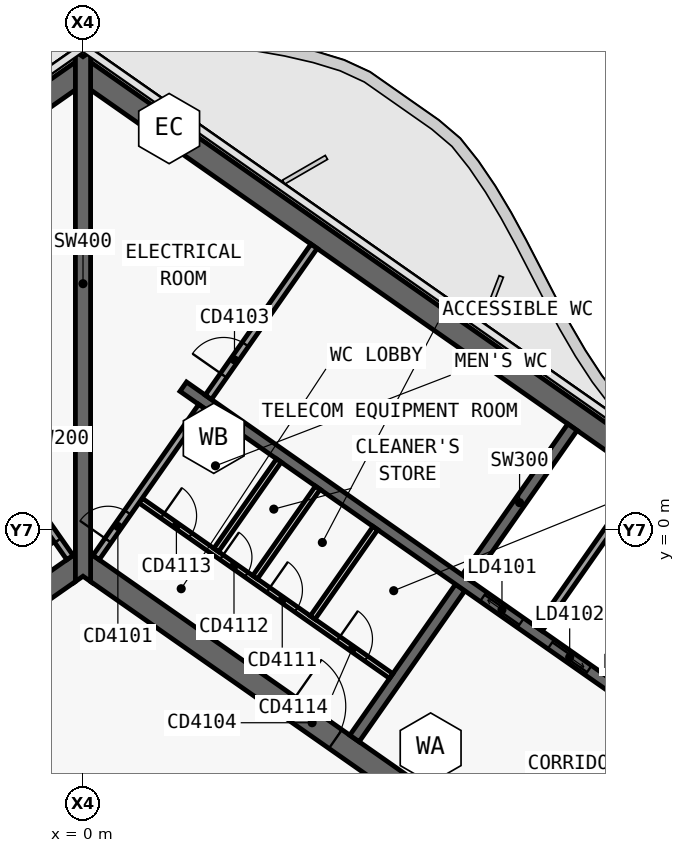
"""IFC4 building model, lengths in metres.
Left out: names, types, materials, properties, quantities, classifications, styles, units other than length and angle.
Written with IfcOpenShell. Run it as: python <this file> out.ifc"""

import sys

from ifc_helpers import new_model, si_unit, direction, frame, frame_2d, origin, place, context, subcontext, project, spatial, polyline, rectangle, outline, extrude, element, fill, save


model = new_model("IFC4")
c1 = context("Model", 3, precision=1e-05, world=origin(), true_north=direction((0.0, 1.0)))
c2 = subcontext(c1, "Body", "Model", "MODEL_VIEW")
j1 = project(units=[si_unit("LENGTHUNIT", "METRE"), si_unit("PLANEANGLEUNIT", "RADIAN")], contexts=[c1])
p1 = place(None, origin())
s1 = spatial("IfcSite", under=j1, at=p1, CompositionType="ELEMENT")
p2 = place(p1, origin())
s2 = spatial("IfcBuilding", under=s1, at=p2, CompositionType="ELEMENT")
p3 = place(p2, frame((0.0, 0.0, 225.4)))
s3 = spatial("IfcBuildingStorey", under=s2, at=p3, CompositionType="ELEMENT", Elevation=225.4)
p4 = place(p3, frame((-0.028, 12.066, 0.0), z_axis=(0.0, 0.0, 1.0), x_axis=(-0.819151382952, -0.573577380837, 0.0)))
e1 = element("IfcWall", 1, at=p4, inside=s3, PredefinedType="SHEAR", context=c2, shape_type="SweptSolid", body=[
    extrude(outline(polyline([(33.898, 0.3), (0.42, 0.3), (0.0, -0.3), (33.898, -0.3), (33.898, 0.3)])), origin(), (0.0, 0.0, 1.0), 3.9),
])
p5 = place(p3, frame((-0.028, -0.874, 0.0), z_axis=(0.0, 0.0, 1.0), x_axis=(-0.819150035022, -0.573579305871, 0.0)))
e2 = element("IfcWall", 2, at=p5, inside=s3, PredefinedType="SHEAR", context=c2, shape_type="SweptSolid", body=[
    extrude(outline(polyline([(26.476, 0.3), (0.42, 0.3), (0.0, -0.3), (26.476, -0.3), (26.476, 0.3)])), origin(), (0.0, 0.0, 1.0), 3.9),
])
p6 = place(p5, frame((2.976, 0.0, 0.0)))
e3 = element("IfcOpeningElement", 3, at=p6, cuts=e2, PredefinedType="OPENING", context=c2, shape_type="SweptSolid", body=[
    extrude(rectangle(XDim=2.4, YDim=2.1, at=frame_2d((1.2, 1.05))), frame((0.0, 0.31, 0.0), z_axis=(0.0, -1.0, 0.0), x_axis=(1.0, 0.0, 0.0)), (0.0, 0.0, 1.0), 0.62),
])
p7 = place(p5, frame((11.776, 0.0, 0.0)))
e4 = element("IfcOpeningElement", 4, at=p7, cuts=e2, PredefinedType="OPENING", context=c2, shape_type="SweptSolid", body=[
    extrude(rectangle(XDim=2.4, YDim=2.1, at=frame_2d((1.2, 1.05))), frame((0.0, 0.31, 0.0), z_axis=(0.0, -1.0, 0.0), x_axis=(1.0, 0.0, 0.0)), (0.0, 0.0, 1.0), 0.62),
])
p8 = place(p3, frame((0.028, 12.066, 0.0), z_axis=(0.0, 0.0, 1.0), x_axis=(0.819151382952, -0.573577380837, 0.0)))
e5 = element("IfcWall", 5, at=p8, inside=s3, PredefinedType="SHEAR", context=c2, shape_type="SweptSolid", body=[
    extrude(outline(polyline([(33.898, 0.3), (0.0, 0.3), (0.42, -0.3), (33.898, -0.3), (33.898, 0.3)])), origin(), (0.0, 0.0, 1.0), 3.9),
])
p9 = place(p3, frame((0.028, -0.874, 0.0), z_axis=(0.0, 0.0, 1.0), x_axis=(0.819150035022, -0.573579305871, 0.0)))
e6 = element("IfcWall", 6, at=p9, inside=s3, PredefinedType="SHEAR", context=c2, shape_type="SweptSolid", body=[
    extrude(outline(polyline([(26.476, 0.3), (0.0, 0.3), (0.42, -0.3), (26.476, -0.3), (26.476, 0.3)])), origin(), (0.0, 0.0, 1.0), 3.9),
])
p10 = place(p9, frame((6.576, 0.0, 0.0)))
e7 = element("IfcOpeningElement", 7, at=p10, cuts=e6, PredefinedType="OPENING", context=c2, shape_type="SweptSolid", body=[
    extrude(rectangle(XDim=1.5, YDim=2.1, at=frame_2d((0.75, 1.05))), frame((0.0, 0.31, 0.0), z_axis=(0.0, -1.0, 0.0), x_axis=(1.0, 0.0, 0.0)), (0.0, 0.0, 1.0), 0.62),
])
p11 = place(p9, frame((12.226, 0.0, 0.0)))
e8 = element("IfcOpeningElement", 8, at=p11, cuts=e6, PredefinedType="OPENING", context=c2, shape_type="SweptSolid", body=[
    extrude(rectangle(XDim=1.5, YDim=2.1, at=frame_2d((0.75, 1.05))), frame((0.0, 0.31, 0.0), z_axis=(0.0, -1.0, 0.0), x_axis=(1.0, 0.0, 0.0)), (0.0, 0.0, 1.0), 0.62),
])
p12 = place(p3, frame((7.143, -5.49, 0.0), z_axis=(0.0, 0.0, 1.0), x_axis=(0.573617744349, 0.819123118565, 0.0)))
e9 = element("IfcWall", 9, at=p12, inside=s3, PredefinedType="SHEAR", context=c2, shape_type="SweptSolid", body=[
    extrude(outline(polyline([(0.0, 0.15), (0.0, -0.15), (4.85, -0.15), (4.85, 0.15), (0.0, 0.15)])), origin(), (0.0, 0.0, 1.0), 3.9),
])
p13 = place(p3, frame((10.097, -1.271, 0.0), z_axis=(0.0, 0.0, 1.0), x_axis=(0.573560315113, 0.819163332265, 0.0)))
e10 = element("IfcWall", 10, at=p13, inside=s3, PredefinedType="SHEAR", context=c2, shape_type="SweptSolid", body=[
    extrude(outline(polyline([(4.85, -0.15), (4.85, 0.15), (0.0, 0.15), (0.0, -0.15), (4.85, -0.15)])), origin(), (0.0, 0.0, 1.0), 3.9),
])
p14 = place(p3, frame((2.638, 3.768, 0.0), z_axis=(0.0, 0.0, 1.0), x_axis=(0.819155014212, -0.573572194837, 0.0)))
e11 = element("IfcWall", 11, at=p14, inside=s3, PredefinedType="SHEAR", context=c2, shape_type="SweptSolid", body=[
    extrude(outline(polyline([(0.0, 0.15), (0.0, -0.15), (26.4, -0.15), (26.4, 0.15), (0.0, 0.15)])), origin(), (0.0, 0.0, 1.0), 3.9),
])
p15 = place(p14, frame((9.637, 0.0, 0.0)))
e12 = element("IfcOpeningElement", 12, at=p15, cuts=e11, PredefinedType="OPENING", context=c2, shape_type="SweptSolid", body=[
    extrude(rectangle(XDim=1.2, YDim=2.1, at=frame_2d((0.6, 1.05))), frame((0.0, 0.16, 0.0), z_axis=(0.0, -1.0, 0.0), x_axis=(1.0, 0.0, 0.0)), (0.0, 0.0, 1.0), 0.32),
])
p16 = place(p14, frame((11.812, 0.0, 0.0)))
e13 = element("IfcOpeningElement", 13, at=p16, cuts=e11, PredefinedType="OPENING", context=c2, shape_type="SweptSolid", body=[
    extrude(rectangle(XDim=1.2, YDim=2.1, at=frame_2d((0.6, 1.05))), frame((0.0, 0.16, 0.0), z_axis=(0.0, -1.0, 0.0), x_axis=(1.0, 0.0, 0.0)), (0.0, 0.0, 1.0), 0.32),
])
p17 = place(p14, frame((13.988, 0.0, 0.0)))
e14 = element("IfcOpeningElement", 14, at=p17, cuts=e11, PredefinedType="OPENING", context=c2, shape_type="SweptSolid", body=[
    extrude(rectangle(XDim=1.2, YDim=2.1, at=frame_2d((0.6, 1.05))), frame((0.0, 0.16, 0.0), z_axis=(0.0, -1.0, 0.0), x_axis=(1.0, 0.0, 0.0)), (0.0, 0.0, 1.0), 0.32),
])
p18 = place(p14, frame((16.262, 0.0, 0.0)))
e15 = element("IfcOpeningElement", 15, at=p18, cuts=e11, PredefinedType="OPENING", context=c2, shape_type="SweptSolid", body=[
    extrude(rectangle(XDim=1.0, YDim=2.1, at=frame_2d((0.5, 1.05))), frame((0.0, 0.16, 0.0), z_axis=(0.0, -1.0, 0.0), x_axis=(1.0, 0.0, 0.0)), (0.0, 0.0, 1.0), 0.32),
])
p19 = place(p3, frame((0.0, -1.361, 0.0), z_axis=(0.0, 0.0, 1.0), x_axis=(0.0, 1.0, 0.0)))
e16 = element("IfcWall", 16, at=p19, inside=s3, PredefinedType="SHEAR", context=c2, shape_type="SweptSolid", body=[
    extrude(outline(polyline([(0.14, 0.2), (0.0, 0.2), (0.14, 0.0), (0.0, -0.2), (0.14, -0.2), (1.012, -0.2), (12.94, -0.2), (13.813, -0.2), (13.893, -0.2), (13.933, -0.172), (13.813, 0.0), (13.933, 0.172), (13.893, 0.2), (13.813, 0.2), (12.94, 0.2), (1.012, 0.2), (0.14, 0.2)])), origin(), (0.0, 0.0, 1.0), 3.9),
])
p20 = place(p3, frame((12.001, -2.605, 0.0), z_axis=(0.0, 0.0, 1.0), x_axis=(0.573560315113, 0.819163332265, 0.0)))
e17 = element("IfcWall", 17, at=p20, inside=s3, PredefinedType="SOLIDWALL", context=c2, shape_type="SweptSolid", body=[
    extrude(rectangle(XDim=4.85, YDim=0.2, at=frame_2d((2.425, 0.0))), origin(), (0.0, 0.0, 1.0), 3.9),
])
p21 = place(p3, frame((13.783, -3.852, 0.0), z_axis=(0.0, 0.0, 1.0), x_axis=(0.573594092424, 0.81913968109, 0.0)))
e18 = element("IfcWall", 18, at=p21, inside=s3, PredefinedType="SOLIDWALL", context=c2, shape_type="SweptSolid", body=[
    extrude(rectangle(XDim=4.85, YDim=0.2, at=frame_2d((2.425, 0.0))), origin(), (0.0, 0.0, 1.0), 3.9),
])
p22 = place(p3, frame((1.516, 0.77, 0.0), z_axis=(0.0, 0.0, 1.0), x_axis=(0.819146424436, -0.573584462249, 0.0)))
e19 = element("IfcWall", 19, at=p22, inside=s3, PredefinedType="PARTITIONING", context=c2, shape_type="SweptSolid", body=[
    extrude(rectangle(XDim=8.05, YDim=0.15, at=frame_2d((4.025, 0.0))), origin(), (0.0, 0.0, 1.0), 3.62),
])
p23 = place(p22, frame((0.7, 0.0, 0.0)))
e20 = element("IfcOpeningElement", 20, at=p23, cuts=e19, PredefinedType="OPENING", context=c2, shape_type="SweptSolid", body=[
    extrude(rectangle(XDim=0.9, YDim=2.1, at=frame_2d((0.45, 1.05))), frame((0.0, 0.085, 0.0), z_axis=(0.0, -1.0, 0.0), x_axis=(1.0, 0.0, 0.0)), (0.0, 0.0, 1.0), 0.17),
])
p24 = place(p22, frame((2.6, 0.0, 0.0)))
e21 = element("IfcOpeningElement", 21, at=p24, cuts=e19, PredefinedType="OPENING", context=c2, shape_type="SweptSolid", body=[
    extrude(rectangle(XDim=0.8, YDim=2.1, at=frame_2d((0.4, 1.05))), frame((0.0, 0.085, 0.0), z_axis=(0.0, -1.0, 0.0), x_axis=(1.0, 0.0, 0.0)), (0.0, 0.0, 1.0), 0.17),
])
p25 = place(p22, frame((4.1, 0.0, 0.0)))
e22 = element("IfcOpeningElement", 22, at=p25, cuts=e19, PredefinedType="OPENING", context=c2, shape_type="SweptSolid", body=[
    extrude(rectangle(XDim=0.9, YDim=2.1, at=frame_2d((0.45, 1.05))), frame((0.0, 0.085, 0.0), z_axis=(0.0, -1.0, 0.0), x_axis=(1.0, 0.0, 0.0)), (0.0, 0.0, 1.0), 0.17),
])
p26 = place(p22, frame((6.35, 0.0, 0.0)))
e23 = element("IfcOpeningElement", 23, at=p26, cuts=e19, PredefinedType="OPENING", context=c2, shape_type="SweptSolid", body=[
    extrude(rectangle(XDim=0.9, YDim=2.1, at=frame_2d((0.45, 1.05))), frame((0.0, 0.085, 0.0), z_axis=(0.0, -1.0, 0.0), x_axis=(1.0, 0.0, 0.0)), (0.0, 0.0, 1.0), 0.17),
])
p27 = place(p3, frame((3.504, -0.531, 0.0), z_axis=(0.0, 0.0, 1.0), x_axis=(0.573582013179, 0.819148139324, 0.0)))
e24 = element("IfcWall", 24, at=p27, inside=s3, PredefinedType="PARTITIONING", context=c2, shape_type="SweptSolid", body=[
    extrude(rectangle(XDim=2.875, YDim=0.15, at=frame_2d((1.438, 0.0))), origin(), (0.0, 0.0, 1.0), 3.62),
])
p28 = place(p3, frame((4.528, -1.248, 0.0), z_axis=(0.0, 0.0, 1.0), x_axis=(0.573621911162, 0.819120200602, 0.0)))
e25 = element("IfcWall", 25, at=p28, inside=s3, PredefinedType="PARTITIONING", context=c2, shape_type="SweptSolid", body=[
    extrude(rectangle(XDim=2.875, YDim=0.15, at=frame_2d((1.438, 0.0))), origin(), (0.0, 0.0, 1.0), 3.62),
])
p29 = place(p3, frame((6.044, -2.309, 0.0), z_axis=(0.0, 0.0, 1.0), x_axis=(0.573564930514, 0.819160100642, 0.0)))
e26 = element("IfcWall", 26, at=p29, inside=s3, PredefinedType="PARTITIONING", context=c2, shape_type="SweptSolid", body=[
    extrude(rectangle(XDim=2.875, YDim=0.15, at=frame_2d((1.438, 0.0))), origin(), (0.0, 0.0, 1.0), 3.62),
])
p30 = place(p3, frame((-0.344, -0.729, 0.0), z_axis=(0.0, 0.0, 1.0), x_axis=(-0.573560315113, 0.819163332265, 0.0)))
e27 = element("IfcWall", 27, at=p30, inside=s3, PredefinedType="SOLIDWALL", context=c2, shape_type="SweptSolid", body=[
    extrude(rectangle(XDim=4.85, YDim=0.2, at=frame_2d((2.425, 0.0))), origin(), (0.0, 0.0, 1.0), 3.62),
])
p31 = place(p30, frame((0.55, 0.0, 0.0)))
e28 = element("IfcOpeningElement", 28, at=p31, cuts=e27, PredefinedType="OPENING", context=c2, shape_type="SweptSolid", body=[
    extrude(rectangle(XDim=0.9, YDim=2.1, at=frame_2d((0.45, 1.05))), frame((0.0, 0.11, 0.0), z_axis=(0.0, -1.0, 0.0), x_axis=(1.0, 0.0, 0.0)), (0.0, 0.0, 1.0), 0.22),
])
p32 = place(p3, frame((0.344, -0.729, 0.0), z_axis=(0.0, 0.0, 1.0), x_axis=(0.573560315113, 0.819163332265, 0.0)))
e29 = element("IfcWall", 29, at=p32, inside=s3, PredefinedType="SOLIDWALL", context=c2, shape_type="SweptSolid", body=[
    extrude(rectangle(XDim=4.85, YDim=0.2, at=frame_2d((2.425, 0.0))), origin(), (0.0, 0.0, 1.0), 3.62),
])
p33 = place(p32, frame((0.55, 0.0, 0.0)))
e30 = element("IfcOpeningElement", 30, at=p33, cuts=e29, PredefinedType="OPENING", context=c2, shape_type="SweptSolid", body=[
    extrude(rectangle(XDim=0.9, YDim=2.1, at=frame_2d((0.45, 1.05))), frame((0.0, 0.11, 0.0), z_axis=(0.0, -1.0, 0.0), x_axis=(1.0, 0.0, 0.0)), (0.0, 0.0, 1.0), 0.22),
])
p34 = place(p3, frame((3.298, 3.49, 0.0), z_axis=(0.0, 0.0, 1.0), x_axis=(0.573560315113, 0.819163332265, 0.0)))
e31 = element("IfcWall", 31, at=p34, inside=s3, PredefinedType="SOLIDWALL", context=c2, shape_type="SweptSolid", body=[
    extrude(rectangle(XDim=4.85, YDim=0.2, at=frame_2d((2.425, 0.0))), origin(), (0.0, 0.0, 1.0), 3.62),
])
p35 = place(p34, frame((0.7, 0.0, 0.0)))
e32 = element("IfcOpeningElement", 32, at=p35, cuts=e31, PredefinedType="OPENING", context=c2, shape_type="SweptSolid", body=[
    extrude(rectangle(XDim=1.0, YDim=2.1, at=frame_2d((0.5, 1.05))), frame((0.0, 0.11, 0.0), z_axis=(0.0, -1.0, 0.0), x_axis=(1.0, 0.0, 0.0)), (0.0, 0.0, 1.0), 0.22),
])
p36 = place(p15, origin())
e33 = element("IfcDoor", 33, at=p36, inside=s3, OperationType="SLIDING_TO_LEFT", PredefinedType="DOOR", context=c2, shape_type="SweptSolid", body=[
    extrude(rectangle(XDim=1.2, YDim=2.1, at=frame_2d((0.6, 1.05))), frame((0.0, 0.025, 0.0), z_axis=(0.0, -1.0, 0.0), x_axis=(1.0, 0.0, 0.0)), (0.0, 0.0, 1.0), 0.05),
])
fill(e12, e33)
p37 = place(p16, origin())
e34 = element("IfcDoor", 34, at=p37, inside=s3, OperationType="SLIDING_TO_RIGHT", PredefinedType="DOOR", context=c2, shape_type="SweptSolid", body=[
    extrude(rectangle(XDim=1.2, YDim=2.1, at=frame_2d((0.6, 1.05))), frame((0.0, 0.025, 0.0), z_axis=(0.0, -1.0, 0.0), x_axis=(1.0, 0.0, 0.0)), (0.0, 0.0, 1.0), 0.05),
])
fill(e13, e34)
p38 = place(p23, origin())
e35 = element("IfcDoor", 35, at=p38, inside=s3, OperationType="SINGLE_SWING_RIGHT", PredefinedType="DOOR", context=c2, shape_type="SweptSolid", body=[
    extrude(rectangle(XDim=0.9, YDim=2.1, at=frame_2d((0.45, 1.05))), frame((0.0, 0.025, 0.0), z_axis=(0.0, -1.0, 0.0), x_axis=(1.0, 0.0, 0.0)), (0.0, 0.0, 1.0), 0.05),
])
fill(e20, e35)
p39 = place(p24, origin())
e36 = element("IfcDoor", 36, at=p39, inside=s3, OperationType="SINGLE_SWING_RIGHT", PredefinedType="DOOR", context=c2, shape_type="SweptSolid", body=[
    extrude(rectangle(XDim=0.8, YDim=2.1, at=frame_2d((0.4, 1.05))), frame((0.0, 0.025, 0.0), z_axis=(0.0, -1.0, 0.0), x_axis=(1.0, 0.0, 0.0)), (0.0, 0.0, 1.0), 0.05),
])
fill(e21, e36)
p40 = place(p25, origin())
e37 = element("IfcDoor", 37, at=p40, inside=s3, OperationType="SINGLE_SWING_RIGHT", PredefinedType="DOOR", context=c2, shape_type="SweptSolid", body=[
    extrude(rectangle(XDim=0.9, YDim=2.1, at=frame_2d((0.45, 1.05))), frame((0.0, 0.025, 0.0), z_axis=(0.0, -1.0, 0.0), x_axis=(1.0, 0.0, 0.0)), (0.0, 0.0, 1.0), 0.05),
])
fill(e22, e37)
p41 = place(p26, origin())
e38 = element("IfcDoor", 38, at=p41, inside=s3, OperationType="SINGLE_SWING_RIGHT", PredefinedType="DOOR", context=c2, shape_type="SweptSolid", body=[
    extrude(rectangle(XDim=0.9, YDim=2.1, at=frame_2d((0.45, 1.05))), frame((0.0, 0.025, 0.0), z_axis=(0.0, -1.0, 0.0), x_axis=(1.0, 0.0, 0.0)), (0.0, 0.0, 1.0), 0.05),
])
fill(e23, e38)
p42 = place(p10, origin())
e39 = element("IfcDoor", 39, at=p42, inside=s3, OperationType="SINGLE_SWING_RIGHT", PredefinedType="DOOR", context=c2, shape_type="SweptSolid", body=[
    extrude(rectangle(XDim=1.5, YDim=2.1, at=frame_2d((0.75, 1.05))), frame((0.0, 0.025, 0.0), z_axis=(0.0, -1.0, 0.0), x_axis=(1.0, 0.0, 0.0)), (0.0, 0.0, 1.0), 0.05),
])
fill(e7, e39)
p43 = place(p31, origin())
e40 = element("IfcDoor", 40, at=p43, inside=s3, OperationType="SINGLE_SWING_RIGHT", PredefinedType="DOOR", context=c2, shape_type="SweptSolid", body=[
    extrude(rectangle(XDim=0.9, YDim=2.1, at=frame_2d((0.45, 1.05))), frame((0.0, 0.025, 0.0), z_axis=(0.0, -1.0, 0.0), x_axis=(1.0, 0.0, 0.0)), (0.0, 0.0, 1.0), 0.05),
])
fill(e28, e40)
p44 = place(p33, origin())
e41 = element("IfcDoor", 41, at=p44, inside=s3, OperationType="SINGLE_SWING_RIGHT", PredefinedType="DOOR", context=c2, shape_type="SweptSolid", body=[
    extrude(rectangle(XDim=0.9, YDim=2.1, at=frame_2d((0.45, 1.05))), frame((0.0, 0.025, 0.0), z_axis=(0.0, -1.0, 0.0), x_axis=(1.0, 0.0, 0.0)), (0.0, 0.0, 1.0), 0.05),
])
fill(e30, e41)
p45 = place(p35, origin())
e42 = element("IfcDoor", 42, at=p45, inside=s3, OperationType="SINGLE_SWING_RIGHT", PredefinedType="DOOR", context=c2, shape_type="SweptSolid", body=[
    extrude(rectangle(XDim=1.0, YDim=2.1, at=frame_2d((0.5, 1.05))), frame((0.0, 0.025, 0.0), z_axis=(0.0, -1.0, 0.0), x_axis=(1.0, 0.0, 0.0)), (0.0, 0.0, 1.0), 0.05),
])
fill(e32, e42)
save(model, sys.argv[1])
